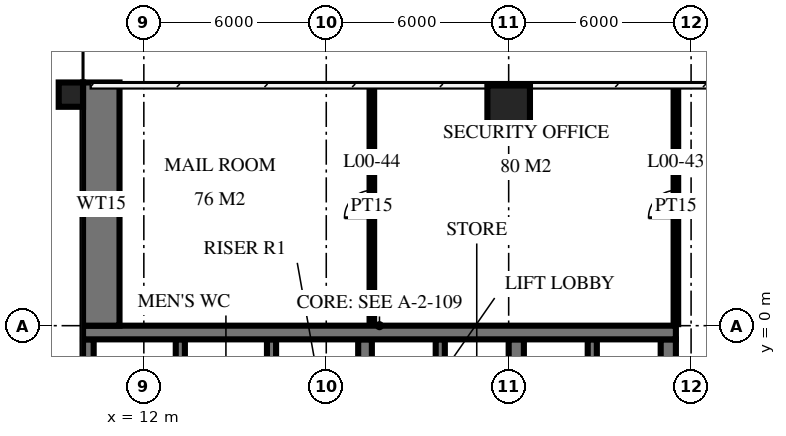
"""IFC4 building model, lengths in metres.
Left out: names, types, materials, properties, quantities, classifications, styles, units other than length and angle.
Written with IfcOpenShell. Run it as: python <this file> out.ifc"""

import sys

from ifc_helpers import new_model, si_unit, direction, frame, frame_2d, origin, origin_2d, place, context, subcontext, project, spatial, rectangle, circle, extrude, element, fill, save


model = new_model("IFC4")
c1 = context("Model", 3, precision=1e-05, world=origin(), true_north=direction((0.0, 1.0)))
c2 = subcontext(c1, "Body", "Model", "MODEL_VIEW")
j1 = project(units=[si_unit("LENGTHUNIT", "METRE"), si_unit("PLANEANGLEUNIT", "RADIAN")], contexts=[c1])
p1 = place(None, origin())
s1 = spatial("IfcSite", under=j1, at=p1, CompositionType="ELEMENT")
p2 = place(p1, origin())
s2 = spatial("IfcBuilding", under=s1, at=p2, CompositionType="ELEMENT")
p3 = place(p2, origin())
s3 = spatial("IfcBuildingStorey", under=s2, at=p3, CompositionType="ELEMENT", Elevation=0.0)
p4 = place(p3, frame((24.0, 7.2, -0.3), z_axis=(0.0, 0.0, 1.0), x_axis=(1.0, 0.0, 0.0)))
e1 = element("IfcColumn", 1, at=p4, inside=s3, PredefinedType="COLUMN", context=c2, shape_type="SweptSolid", body=[
    extrude(circle(Radius=0.7, at=origin_2d()), origin(), (0.0, 0.0, 1.0), 7.3),
])
p5 = place(p3, frame((10.0, -0.225, -0.3), z_axis=(0.0, 0.0, 1.0), x_axis=(1.0, 0.0, 0.0)))
e2 = element("IfcWall", 2, at=p5, inside=s3, PredefinedType="SHEAR", context=c2, shape_type="SweptSolid", body=[
    extrude(rectangle(XDim=19.5, YDim=0.45, at=frame_2d((9.75, 0.0))), origin(), (0.0, 0.0, 1.0), 7.3),
])
p6 = place(p3, frame((10.175, -14.55, -0.3), z_axis=(0.0, 0.0, 1.0), x_axis=(0.0, 1.0, 0.0)))
e3 = element("IfcWall", 3, at=p6, inside=s3, PredefinedType="SHEAR", context=c2, shape_type="SweptSolid", body=[
    extrude(rectangle(XDim=14.1, YDim=0.35, at=frame_2d((7.05, 0.0))), origin(), (0.0, 0.0, 1.0), 7.3),
])
p7 = place(p6, frame((8.4, 0.0, 0.3)))
e4 = element("IfcOpeningElement", 4, at=p7, cuts=e3, PredefinedType="OPENING", context=c2, shape_type="SweptSolid", body=[
    extrude(rectangle(XDim=1.4, YDim=2.4, at=frame_2d((0.7, 1.2))), frame((0.0, 0.185, 0.0), z_axis=(0.0, -1.0, 0.0), x_axis=(1.0, 0.0, 0.0)), (0.0, 0.0, 1.0), 0.37),
])
p8 = place(p6, frame((10.0, 0.0, 0.3)))
e5 = element("IfcOpeningElement", 5, at=p8, cuts=e3, PredefinedType="OPENING", context=c2, shape_type="SweptSolid", body=[
    extrude(rectangle(XDim=1.4, YDim=2.4, at=frame_2d((0.7, 1.2))), frame((0.0, 0.185, 0.0), z_axis=(0.0, -1.0, 0.0), x_axis=(1.0, 0.0, 0.0)), (0.0, 0.0, 1.0), 0.37),
])
p9 = place(p6, frame((4.0, 0.0, 0.3)))
e6 = element("IfcOpeningElement", 6, at=p9, cuts=e3, PredefinedType="OPENING", context=c2, shape_type="SweptSolid", body=[
    extrude(rectangle(XDim=1.2, YDim=2.1, at=frame_2d((0.6, 1.05))), frame((0.0, 0.185, 0.0), z_axis=(0.0, -1.0, 0.0), x_axis=(1.0, 0.0, 0.0)), (0.0, 0.0, 1.0), 0.37),
])
p10 = place(p3, frame((29.25, -14.55, -0.3), z_axis=(0.0, 0.0, 1.0), x_axis=(0.0, 1.0, 0.0)))
e7 = element("IfcWall", 7, at=p10, inside=s3, PredefinedType="SHEAR", context=c2, shape_type="SweptSolid", body=[
    extrude(rectangle(XDim=14.1, YDim=0.5, at=frame_2d((7.05, 0.0))), origin(), (0.0, 0.0, 1.0), 7.3),
])
for number, where, z_axis, x_axis in (
    (8, (13.2, -2.75, -0.3), (0.0, 0.0, 1.0), (0.0, 1.0, 0.0)),
    (9, (16.2, -2.75, -0.3), (0.0, 0.0, 1.0), (0.0, 1.0, 0.0)),
):
    element("IfcWall", number, at=place(p3, frame(where, z_axis=z_axis, x_axis=x_axis)), inside=s3, PredefinedType="SHEAR", context=c2, shape_type="SweptSolid", body=[
        extrude(rectangle(XDim=2.3, YDim=0.3, at=frame_2d((1.15, 0.0))), origin(), (0.0, 0.0, 1.0), 7.3),
    ])
p11 = place(p3, frame((19.275, -2.75, -0.3), z_axis=(0.0, 0.0, 1.0), x_axis=(0.0, 1.0, 0.0)))
e10 = element("IfcWall", 10, at=p11, inside=s3, PredefinedType="SHEAR", context=c2, shape_type="SweptSolid", body=[
    extrude(rectangle(XDim=2.3, YDim=0.45, at=frame_2d((1.15, 0.0))), origin(), (0.0, 0.0, 1.0), 7.3),
])
p12 = place(p3, frame((21.75, -2.75, -0.3), z_axis=(0.0, 0.0, 1.0), x_axis=(0.0, 1.0, 0.0)))
e11 = element("IfcWall", 11, at=p12, inside=s3, PredefinedType="SHEAR", context=c2, shape_type="SweptSolid", body=[
    extrude(rectangle(XDim=2.3, YDim=0.3, at=frame_2d((1.15, 0.0))), origin(), (0.0, 0.0, 1.0), 7.3),
])
p13 = place(p3, frame((24.25, -2.75, -0.3), z_axis=(0.0, 0.0, 1.0), x_axis=(0.0, 1.0, 0.0)))
e12 = element("IfcWall", 12, at=p13, inside=s3, PredefinedType="SHEAR", context=c2, shape_type="SweptSolid", body=[
    extrude(rectangle(XDim=2.3, YDim=0.5, at=frame_2d((1.15, 0.0))), origin(), (0.0, 0.0, 1.0), 7.3),
])
p14 = place(p3, frame((26.75, -2.75, -0.3), z_axis=(0.0, 0.0, 1.0), x_axis=(0.0, 1.0, 0.0)))
e13 = element("IfcWall", 13, at=p14, inside=s3, PredefinedType="SHEAR", context=c2, shape_type="SweptSolid", body=[
    extrude(rectangle(XDim=2.3, YDim=0.3, at=frame_2d((1.15, 0.0))), origin(), (0.0, 0.0, 1.0), 7.3),
])
p15 = place(p3, frame((10.6, 0.0, -0.3), z_axis=(0.0, 0.0, 1.0), x_axis=(0.0, 1.0, 0.0)))
e14 = element("IfcWall", 14, at=p15, inside=s3, PredefinedType="SHEAR", context=c2, shape_type="SweptSolid", body=[
    extrude(rectangle(XDim=8.0, YDim=1.2, at=frame_2d((4.0, 0.0))), origin(), (0.0, 0.0, 1.0), 7.3),
])
p16 = place(p3, frame((9.6, 7.6, -0.3), z_axis=(0.0, 0.0, 1.0), x_axis=(1.0, 0.0, 0.0)))
e15 = element("IfcColumn", 15, at=p16, inside=s3, PredefinedType="COLUMN", context=c2, shape_type="SweptSolid", body=[
    extrude(rectangle(XDim=0.8, YDim=0.8, at=origin_2d()), origin(), (0.0, 0.0, 1.0), 7.3),
])
p17 = place(p3, frame((29.5, 0.05, 0.0), z_axis=(0.0, 0.0, 1.0), x_axis=(0.0, 1.0, 0.0)))
e16 = element("IfcWall", 16, at=p17, inside=s3, PredefinedType="PARTITIONING", context=c2, shape_type="SweptSolid", body=[
    extrude(rectangle(XDim=7.77, YDim=0.15, at=frame_2d((3.885, 0.0))), origin(), (0.0, 0.0, 1.0), 6.55),
])
p18 = place(p17, frame((3.5, 0.0, 0.0)))
e17 = element("IfcOpeningElement", 17, at=p18, cuts=e16, PredefinedType="OPENING", context=c2, shape_type="SweptSolid", body=[
    extrude(rectangle(XDim=0.9, YDim=2.1, at=frame_2d((0.45, 1.05))), frame((0.0, 0.085, 0.0), z_axis=(0.0, -1.0, 0.0), x_axis=(1.0, 0.0, 0.0)), (0.0, 0.0, 1.0), 0.17),
])
p19 = place(p3, frame((19.5, 0.05, 0.0), z_axis=(0.0, 0.0, 1.0), x_axis=(0.0, 1.0, 0.0)))
e18 = element("IfcWall", 18, at=p19, inside=s3, PredefinedType="PARTITIONING", context=c2, shape_type="SweptSolid", body=[
    extrude(rectangle(XDim=7.77, YDim=0.15, at=frame_2d((3.885, 0.0))), origin(), (0.0, 0.0, 1.0), 6.55),
])
p20 = place(p19, frame((3.5, 0.0, 0.0)))
e19 = element("IfcOpeningElement", 19, at=p20, cuts=e18, PredefinedType="OPENING", context=c2, shape_type="SweptSolid", body=[
    extrude(rectangle(XDim=0.9, YDim=2.1, at=frame_2d((0.45, 1.05))), frame((0.0, 0.085, 0.0), z_axis=(0.0, -1.0, 0.0), x_axis=(1.0, 0.0, 0.0)), (0.0, 0.0, 1.0), 0.17),
])
p21 = place(p18, origin())
e20 = element("IfcDoor", 20, at=p21, inside=s3, OperationType="SINGLE_SWING_RIGHT", PredefinedType="DOOR", context=c2, shape_type="SweptSolid", body=[
    extrude(rectangle(XDim=0.9, YDim=2.1, at=frame_2d((0.45, 1.05))), frame((0.0, 0.025, 0.0), z_axis=(0.0, -1.0, 0.0), x_axis=(1.0, 0.0, 0.0)), (0.0, 0.0, 1.0), 0.05),
])
fill(e17, e20)
p22 = place(p20, origin())
e21 = element("IfcDoor", 21, at=p22, inside=s3, OperationType="SINGLE_SWING_RIGHT", PredefinedType="DOOR", context=c2, shape_type="SweptSolid", body=[
    extrude(rectangle(XDim=0.9, YDim=2.1, at=frame_2d((0.45, 1.05))), frame((0.0, 0.025, 0.0), z_axis=(0.0, -1.0, 0.0), x_axis=(1.0, 0.0, 0.0)), (0.0, 0.0, 1.0), 0.05),
])
fill(e19, e21)
save(model, sys.argv[1])
